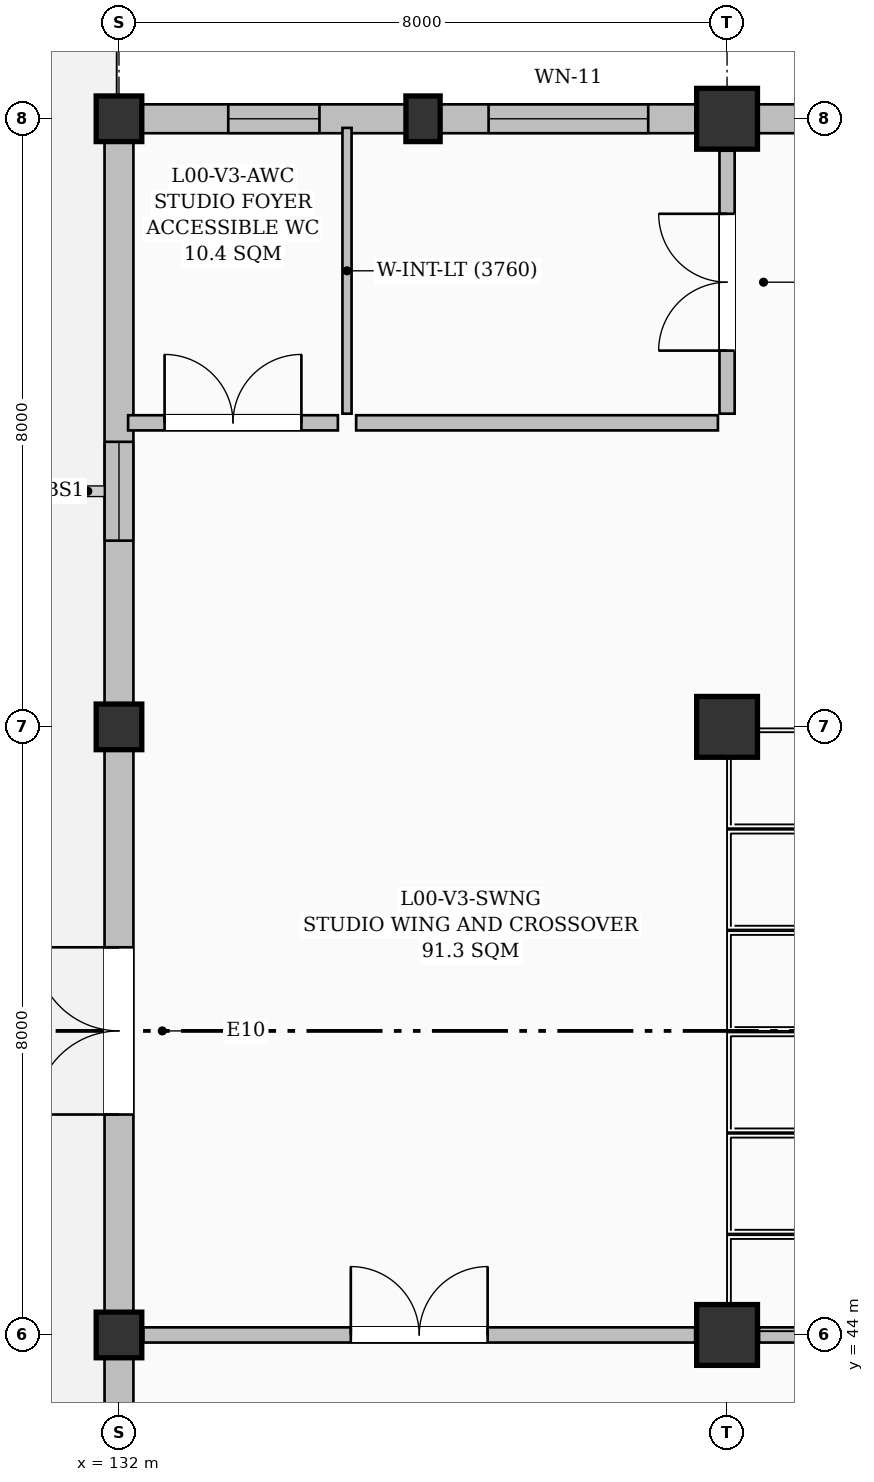
"""IFC4 building model, lengths in metres.
Left out: names, types, materials, properties, quantities, classifications, styles, units other than length and angle.
Written with IfcOpenShell. Run it as: python <this file> out.ifc"""

import sys

from ifc_helpers import new_model, si_unit, direction, frame, frame_2d, origin, origin_2d, place, context, subcontext, project, spatial, rectangle, extrude, element, fill, save


model = new_model("IFC4")
c1 = context("Model", 3, precision=1e-05, world=origin(), true_north=direction((0.0, 1.0)))
c2 = subcontext(c1, "Body", "Model", "MODEL_VIEW")
j1 = project(units=[si_unit("LENGTHUNIT", "METRE"), si_unit("PLANEANGLEUNIT", "RADIAN")], contexts=[c1])
p1 = place(None, origin())
s1 = spatial("IfcSite", under=j1, at=p1, CompositionType="ELEMENT")
p2 = place(p1, origin())
s2 = spatial("IfcBuilding", under=s1, at=p2, CompositionType="ELEMENT")
p3 = place(p2, origin())
s3 = spatial("IfcBuildingStorey", under=s2, at=p3, CompositionType="ELEMENT", Elevation=0.0)
for number, where, z_axis, x_axis in (
    (1, (132.0, 44.0, 0.0), (0.0, 0.0, 1.0), (1.0, 0.0, 0.0)),
    (2, (132.0, 52.0, 0.0), (0.0, 0.0, 1.0), (1.0, 0.0, 0.0)),
    (3, (132.0, 60.0, 0.0), (0.0, 0.0, 1.0), (1.0, 0.0, 0.0)),
):
    element("IfcColumn", number, at=place(p3, frame(where, z_axis=z_axis, x_axis=x_axis)), inside=s3, PredefinedType="COLUMN", context=c2, shape_type="SweptSolid", body=[
        extrude(rectangle(XDim=0.6, YDim=0.6, at=origin_2d()), origin(), (0.0, 0.0, 1.0), 4.8),
    ])
p4 = place(p3, frame((136.0, 60.0, 0.0), z_axis=(0.0, 0.0, 1.0), x_axis=(1.0, 0.0, 0.0)))
e4 = element("IfcColumn", 4, at=p4, inside=s3, PredefinedType="PILASTER", context=c2, shape_type="SweptSolid", body=[
    extrude(rectangle(XDim=0.45, YDim=0.6, at=origin_2d()), origin(), (0.0, 0.0, 1.0), 4.8),
])
for number, where, z_axis, x_axis in (
    (5, (140.0, 44.0, 0.0), (0.0, 0.0, 1.0), (1.0, 0.0, 0.0)),
    (6, (140.0, 52.0, 0.0), (0.0, 0.0, 1.0), (1.0, 0.0, 0.0)),
    (7, (140.0, 60.0, 0.0), (0.0, 0.0, 1.0), (1.0, 0.0, 0.0)),
):
    element("IfcColumn", number, at=place(p3, frame(where, z_axis=z_axis, x_axis=x_axis)), inside=s3, PredefinedType="COLUMN", context=c2, shape_type="SweptSolid", body=[
        extrude(rectangle(XDim=0.8, YDim=0.8, at=origin_2d()), origin(), (0.0, 0.0, 1.0), 4.8),
    ])
p5 = place(p3, frame((132.0, 36.3, 0.0), z_axis=(0.0, 0.0, 1.0), x_axis=(0.0, 1.0, 0.0)))
e8 = element("IfcWall", 8, at=p5, inside=s3, PredefinedType="SOLIDWALL", context=c2, shape_type="SweptSolid", body=[
    extrude(rectangle(XDim=7.4, YDim=0.38, at=frame_2d((3.7, 0.0))), origin(), (0.0, 0.0, 1.0), 3.935),
])
p6 = place(p5, frame((3.1, 0.0, 0.95)))
e9 = element("IfcOpeningElement", 9, at=p6, cuts=e8, PredefinedType="OPENING", context=c2, shape_type="SweptSolid", body=[
    extrude(rectangle(XDim=1.2, YDim=1.5, at=frame_2d((0.6, 0.75))), frame((0.0, 0.2, 0.0), z_axis=(0.0, -1.0, 0.0), x_axis=(1.0, 0.0, 0.0)), (0.0, 0.0, 1.0), 0.4),
])
p7 = place(p3, frame((132.0, 44.3, 0.0), z_axis=(0.0, 0.0, 1.0), x_axis=(0.0, 1.0, 0.0)))
e10 = element("IfcWall", 10, at=p7, inside=s3, PredefinedType="SOLIDWALL", context=c2, shape_type="SweptSolid", body=[
    extrude(rectangle(XDim=7.4, YDim=0.38, at=frame_2d((3.7, 0.0))), origin(), (0.0, 0.0, 1.0), 4.235),
])
p8 = place(p7, frame((2.6, 0.0, 0.0)))
e11 = element("IfcOpeningElement", 11, at=p8, cuts=e10, PredefinedType="OPENING", context=c2, shape_type="SweptSolid", body=[
    extrude(rectangle(XDim=2.2, YDim=2.4, at=frame_2d((1.1, 1.2))), frame((0.0, 0.2, 0.0), z_axis=(0.0, -1.0, 0.0), x_axis=(1.0, 0.0, 0.0)), (0.0, 0.0, 1.0), 0.4),
])
p9 = place(p3, frame((132.0, 52.3, 0.0), z_axis=(0.0, 0.0, 1.0), x_axis=(0.0, 1.0, 0.0)))
e12 = element("IfcWall", 12, at=p9, inside=s3, PredefinedType="SOLIDWALL", context=c2, shape_type="SweptSolid", body=[
    extrude(rectangle(XDim=7.4, YDim=0.38, at=frame_2d((3.7, 0.0))), origin(), (0.0, 0.0, 1.0), 4.335),
])
p10 = place(p9, frame((2.15, 0.0, 0.95)))
e13 = element("IfcOpeningElement", 13, at=p10, cuts=e12, PredefinedType="OPENING", context=c2, shape_type="SweptSolid", body=[
    extrude(rectangle(XDim=1.3, YDim=1.4, at=frame_2d((0.65, 0.7))), frame((0.0, 0.2, 0.0), z_axis=(0.0, -1.0, 0.0), x_axis=(1.0, 0.0, 0.0)), (0.0, 0.0, 1.0), 0.4),
])
p11 = place(p3, frame((132.3, 60.0, 0.0), z_axis=(0.0, 0.0, 1.0), x_axis=(1.0, 0.0, 0.0)))
e14 = element("IfcWall", 14, at=p11, inside=s3, PredefinedType="SOLIDWALL", context=c2, shape_type="SweptSolid", body=[
    extrude(rectangle(XDim=3.475, YDim=0.38, at=frame_2d((1.737, 0.0))), origin(), (0.0, 0.0, 1.0), 4.035),
])
p12 = place(p11, frame((1.137, 0.0, 0.95)))
e15 = element("IfcOpeningElement", 15, at=p12, cuts=e14, PredefinedType="OPENING", context=c2, shape_type="SweptSolid", body=[
    extrude(rectangle(XDim=1.2, YDim=1.5, at=frame_2d((0.6, 0.75))), frame((0.0, 0.2, 0.0), z_axis=(0.0, -1.0, 0.0), x_axis=(1.0, 0.0, 0.0)), (0.0, 0.0, 1.0), 0.4),
])
p13 = place(p3, frame((136.225, 60.0, 0.0), z_axis=(0.0, 0.0, 1.0), x_axis=(1.0, 0.0, 0.0)))
e16 = element("IfcWall", 16, at=p13, inside=s3, PredefinedType="SOLIDWALL", context=c2, shape_type="SweptSolid", body=[
    extrude(rectangle(XDim=3.375, YDim=0.38, at=frame_2d((1.688, 0.0))), origin(), (0.0, 0.0, 1.0), 4.035),
])
p14 = place(p13, frame((0.637, 0.0, 0.95)))
e17 = element("IfcOpeningElement", 17, at=p14, cuts=e16, PredefinedType="OPENING", context=c2, shape_type="SweptSolid", body=[
    extrude(rectangle(XDim=2.1, YDim=1.5, at=frame_2d((1.05, 0.75))), frame((0.0, 0.2, 0.0), z_axis=(0.0, -1.0, 0.0), x_axis=(1.0, 0.0, 0.0)), (0.0, 0.0, 1.0), 0.4),
])
p15 = place(p3, frame((140.4, 60.0, 0.0), z_axis=(0.0, 0.0, 1.0), x_axis=(1.0, 0.0, 0.0)))
e18 = element("IfcWall", 18, at=p15, inside=s3, PredefinedType="SOLIDWALL", context=c2, shape_type="SweptSolid", body=[
    extrude(rectangle(XDim=3.4, YDim=0.38, at=frame_2d((1.7, 0.0))), origin(), (0.0, 0.0, 1.0), 3.985),
])
p16 = place(p15, frame((1.05, 0.0, 0.95)))
e19 = element("IfcOpeningElement", 19, at=p16, cuts=e18, PredefinedType="OPENING", context=c2, shape_type="SweptSolid", body=[
    extrude(rectangle(XDim=1.3, YDim=1.4, at=frame_2d((0.65, 0.7))), frame((0.0, 0.2, 0.0), z_axis=(0.0, -1.0, 0.0), x_axis=(1.0, 0.0, 0.0)), (0.0, 0.0, 1.0), 0.4),
])
p17 = place(p3, frame((140.42, 44.0, 0.0), z_axis=(0.0, 0.0, 1.0), x_axis=(1.0, 0.0, 0.0)))
e20 = element("IfcWall", 20, at=p17, inside=s3, PredefinedType="PARTITIONING", context=c2, shape_type="SweptSolid", body=[
    extrude(rectangle(XDim=23.26, YDim=0.2, at=frame_2d((11.63, 0.0))), origin(), (0.0, 0.0, 1.0), 3.735),
])
p18 = place(p17, frame((10.73, 0.0, 0.0)))
e21 = element("IfcOpeningElement", 21, at=p18, cuts=e20, PredefinedType="OPENING", context=c2, shape_type="SweptSolid", body=[
    extrude(rectangle(XDim=1.8, YDim=2.35, at=frame_2d((0.9, 1.175))), frame((0.0, 0.11, 0.0), z_axis=(0.0, -1.0, 0.0), x_axis=(1.0, 0.0, 0.0)), (0.0, 0.0, 1.0), 0.22),
])
p19 = place(p3, frame((140.0, 56.12, 0.0), z_axis=(0.0, 0.0, 1.0), x_axis=(0.0, 1.0, 0.0)))
e22 = element("IfcWall", 22, at=p19, inside=s3, PredefinedType="PARTITIONING", context=c2, shape_type="SweptSolid", body=[
    extrude(rectangle(XDim=3.46, YDim=0.2, at=frame_2d((1.73, 0.0))), origin(), (0.0, 0.0, 1.0), 3.635),
])
p20 = place(p19, frame((0.83, 0.0, 0.0)))
e23 = element("IfcOpeningElement", 23, at=p20, cuts=e22, PredefinedType="OPENING", context=c2, shape_type="SweptSolid", body=[
    extrude(rectangle(XDim=1.8, YDim=2.35, at=frame_2d((0.9, 1.175))), frame((0.0, 0.11, 0.0), z_axis=(0.0, -1.0, 0.0), x_axis=(1.0, 0.0, 0.0)), (0.0, 0.0, 1.0), 0.22),
])
p21 = place(p3, frame((132.32, 44.0, 0.0), z_axis=(0.0, 0.0, 1.0), x_axis=(1.0, 0.0, 0.0)))
e24 = element("IfcWall", 24, at=p21, inside=s3, PredefinedType="PARTITIONING", context=c2, shape_type="SweptSolid", body=[
    extrude(rectangle(XDim=7.26, YDim=0.2, at=frame_2d((3.63, 0.0))), origin(), (0.0, 0.0, 1.0), 3.685),
])
p22 = place(p21, frame((2.73, 0.0, 0.0)))
e25 = element("IfcOpeningElement", 25, at=p22, cuts=e24, PredefinedType="OPENING", context=c2, shape_type="SweptSolid", body=[
    extrude(rectangle(XDim=1.8, YDim=2.35, at=frame_2d((0.9, 1.175))), frame((0.0, 0.11, 0.0), z_axis=(0.0, -1.0, 0.0), x_axis=(1.0, 0.0, 0.0)), (0.0, 0.0, 1.0), 0.22),
])
p23 = place(p3, frame((132.12, 56.0, 0.0), z_axis=(0.0, 0.0, 1.0), x_axis=(1.0, 0.0, 0.0)))
e26 = element("IfcWall", 26, at=p23, inside=s3, PredefinedType="PARTITIONING", context=c2, shape_type="SweptSolid", body=[
    extrude(rectangle(XDim=2.76, YDim=0.2, at=frame_2d((1.38, 0.0))), origin(), (0.0, 0.0, 1.0), 4.55),
])
p24 = place(p23, frame((0.48, 0.0, 0.0)))
e27 = element("IfcOpeningElement", 27, at=p24, cuts=e26, PredefinedType="OPENING", context=c2, shape_type="SweptSolid", body=[
    extrude(rectangle(XDim=1.8, YDim=2.35, at=frame_2d((0.9, 1.175))), frame((0.0, 0.11, 0.0), z_axis=(0.0, -1.0, 0.0), x_axis=(1.0, 0.0, 0.0)), (0.0, 0.0, 1.0), 0.22),
])
p25 = place(p3, frame((135.12, 56.0, 0.0), z_axis=(0.0, 0.0, 1.0), x_axis=(1.0, 0.0, 0.0)))
e28 = element("IfcWall", 28, at=p25, inside=s3, PredefinedType="PARTITIONING", context=c2, shape_type="SweptSolid", body=[
    extrude(rectangle(XDim=4.76, YDim=0.2, at=frame_2d((2.38, 0.0))), origin(), (0.0, 0.0, 1.0), 4.55),
])
p26 = place(p3, frame((135.0, 56.12, 0.0), z_axis=(0.0, 0.0, 1.0), x_axis=(0.0, 1.0, 0.0)))
e29 = element("IfcWall", 29, at=p26, inside=s3, PredefinedType="PARTITIONING", context=c2, shape_type="SweptSolid", body=[
    extrude(rectangle(XDim=3.76, YDim=0.12, at=frame_2d((1.88, 0.0))), origin(), (0.0, 0.0, 1.0), 4.55),
])
p27 = place(p8, origin())
e30 = element("IfcDoor", 30, at=p27, inside=s3, OperationType="DOUBLE_DOOR_SINGLE_SWING", PredefinedType="DOOR", context=c2, shape_type="SweptSolid", body=[
    extrude(rectangle(XDim=2.2, YDim=2.4, at=frame_2d((1.1, 1.2))), frame((0.0, 0.025, 0.0), z_axis=(0.0, -1.0, 0.0), x_axis=(1.0, 0.0, 0.0)), (0.0, 0.0, 1.0), 0.05),
])
fill(e11, e30)
p28 = place(p10, origin())
e31 = element("IfcWindow", 31, at=p28, inside=s3, PartitioningType="SINGLE_PANEL", PredefinedType="WINDOW", context=c2, shape_type="SweptSolid", body=[
    extrude(rectangle(XDim=1.3, YDim=1.4, at=frame_2d((0.65, 0.7))), frame((0.0, 0.03, 0.0), z_axis=(0.0, -1.0, 0.0), x_axis=(1.0, 0.0, 0.0)), (0.0, 0.0, 1.0), 0.06),
])
fill(e13, e31)
p29 = place(p12, origin())
e32 = element("IfcWindow", 32, at=p29, inside=s3, PartitioningType="SINGLE_PANEL", PredefinedType="WINDOW", context=c2, shape_type="SweptSolid", body=[
    extrude(rectangle(XDim=1.2, YDim=1.5, at=frame_2d((0.6, 0.75))), frame((0.0, 0.03, 0.0), z_axis=(0.0, -1.0, 0.0), x_axis=(1.0, 0.0, 0.0)), (0.0, 0.0, 1.0), 0.06),
])
fill(e15, e32)
p30 = place(p14, origin())
e33 = element("IfcWindow", 33, at=p30, inside=s3, PartitioningType="TRIPLE_PANEL_VERTICAL", PredefinedType="WINDOW", context=c2, shape_type="SweptSolid", body=[
    extrude(rectangle(XDim=2.1, YDim=1.5, at=frame_2d((1.05, 0.75))), frame((0.0, 0.03, 0.0), z_axis=(0.0, -1.0, 0.0), x_axis=(1.0, 0.0, 0.0)), (0.0, 0.0, 1.0), 0.06),
])
fill(e17, e33)
p31 = place(p20, origin())
e34 = element("IfcDoor", 34, at=p31, inside=s3, OperationType="DOUBLE_DOOR_SINGLE_SWING", PredefinedType="DOOR", context=c2, shape_type="SweptSolid", body=[
    extrude(rectangle(XDim=1.8, YDim=2.35, at=frame_2d((0.9, 1.175))), frame((0.0, 0.025, 0.0), z_axis=(0.0, -1.0, 0.0), x_axis=(1.0, 0.0, 0.0)), (0.0, 0.0, 1.0), 0.05),
])
fill(e23, e34)
p32 = place(p22, origin())
e35 = element("IfcDoor", 35, at=p32, inside=s3, OperationType="DOUBLE_DOOR_SINGLE_SWING", PredefinedType="DOOR", context=c2, shape_type="SweptSolid", body=[
    extrude(rectangle(XDim=1.8, YDim=2.35, at=frame_2d((0.9, 1.175))), frame((0.0, 0.025, 0.0), z_axis=(0.0, -1.0, 0.0), x_axis=(1.0, 0.0, 0.0)), (0.0, 0.0, 1.0), 0.05),
])
fill(e25, e35)
p33 = place(p24, origin())
e36 = element("IfcDoor", 36, at=p33, inside=s3, OperationType="DOUBLE_DOOR_SINGLE_SWING", PredefinedType="DOOR", context=c2, shape_type="SweptSolid", body=[
    extrude(rectangle(XDim=1.8, YDim=2.35, at=frame_2d((0.9, 1.175))), frame((0.0, 0.025, 0.0), z_axis=(0.0, -1.0, 0.0), x_axis=(1.0, 0.0, 0.0)), (0.0, 0.0, 1.0), 0.05),
])
fill(e27, e36)
save(model, sys.argv[1])
